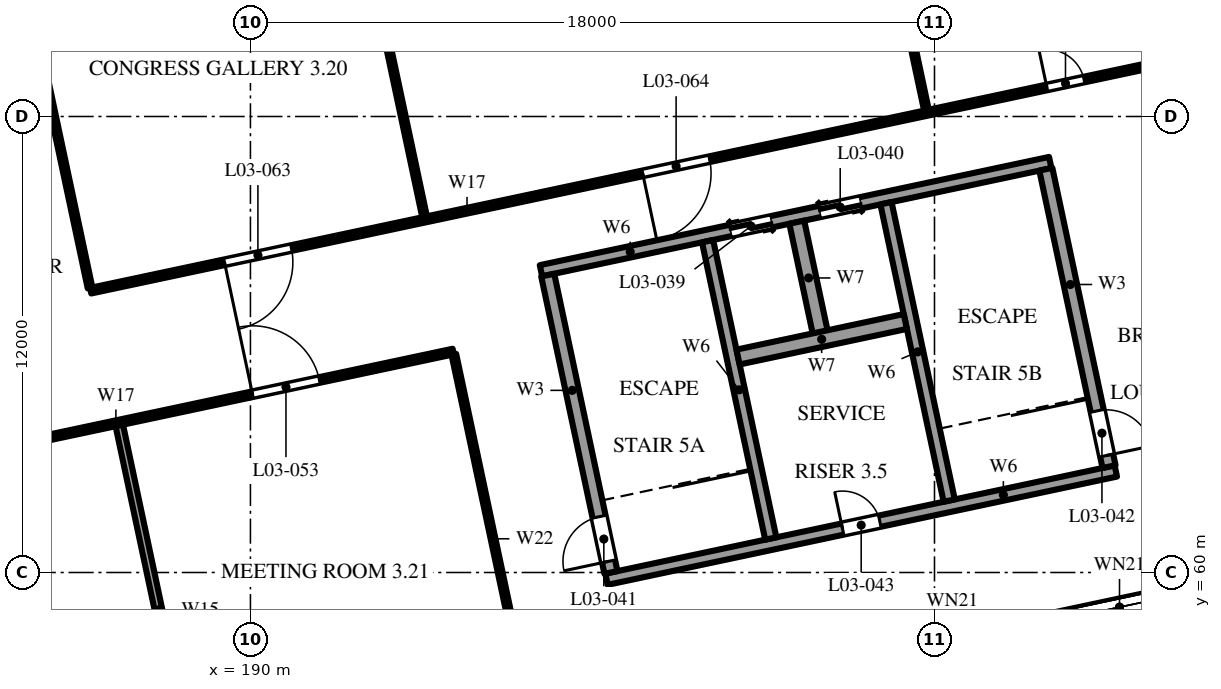
"""IFC4 building model, lengths in metres.
Left out: names, types, materials, properties, quantities, classifications, styles, units other than length and angle.
Written with IfcOpenShell. Run it as: python <this file> out.ifc"""

import sys

from ifc_helpers import new_model, si_unit, direction, frame, frame_2d, origin, place, context, subcontext, project, spatial, polyline, rectangle, outline, extrude, element, fill, save


model = new_model("IFC4")
c1 = context("Model", 3, precision=1e-05, world=origin(), true_north=direction((0.0, 1.0)))
c2 = subcontext(c1, "Body", "Model", "MODEL_VIEW")
j1 = project(units=[si_unit("LENGTHUNIT", "METRE"), si_unit("PLANEANGLEUNIT", "RADIAN")], contexts=[c1])
p1 = place(None, origin())
s1 = spatial("IfcSite", under=j1, at=p1, CompositionType="ELEMENT")
p2 = place(p1, origin())
s2 = spatial("IfcBuilding", under=s1, at=p2, CompositionType="ELEMENT")
p3 = place(p2, frame((0.0, 0.0, 16.8)))
s3 = spatial("IfcBuildingStorey", under=s2, at=p3, CompositionType="ELEMENT", Elevation=16.8)
p4 = place(p3, frame((199.371, 59.822, 0.0), z_axis=(0.0, 0.0, 1.0), x_axis=(0.978147662755, 0.20791139903, 0.0)))
e1 = element("IfcWall", 1, at=p4, inside=s3, PredefinedType="SHEAR", context=c2, shape_type="SweptSolid", body=[
    extrude(outline(polyline([(0.0, 0.0), (13.7, 0.0), (13.7, 14.977), (0.0, 14.244), (0.0, 0.0)])), frame((0.0, 0.15, 0.0), z_axis=(0.0, -1.0, 0.0), x_axis=(1.0, 0.0, 0.0)), (0.0, 0.0, 1.0), 0.3),
])
p5 = place(p4, frame((6.35, 0.0, 0.0)))
e2 = element("IfcOpeningElement", 2, at=p5, cuts=e1, PredefinedType="OPENING", context=c2, shape_type="SweptSolid", body=[
    extrude(rectangle(XDim=1.0, YDim=2.1, at=frame_2d((0.5, 1.05))), frame((0.0, 0.16, 0.0), z_axis=(0.0, -1.0, 0.0), x_axis=(1.0, 0.0, 0.0)), (0.0, 0.0, 1.0), 0.32),
])
p6 = place(p3, frame((197.645, 67.941, 0.0), z_axis=(0.0, 0.0, 1.0), x_axis=(0.978147662755, 0.20791139903, 0.0)))
e3 = element("IfcWall", 3, at=p6, inside=s3, PredefinedType="SHEAR", context=c2, shape_type="SweptSolid", body=[
    extrude(outline(polyline([(0.0, 0.0), (13.7, 0.0), (13.7, 14.542), (0.0, 13.809), (0.0, 0.0)])), frame((0.0, 0.15, 0.0), z_axis=(0.0, -1.0, 0.0), x_axis=(1.0, 0.0, 0.0)), (0.0, 0.0, 1.0), 0.3),
])
p7 = place(p6, frame((5.1, 0.0, 0.0)))
e4 = element("IfcOpeningElement", 4, at=p7, cuts=e3, PredefinedType="OPENING", context=c2, shape_type="SweptSolid", body=[
    extrude(rectangle(XDim=1.1, YDim=2.1, at=frame_2d((0.55, 1.05))), frame((0.0, 0.16, 0.0), z_axis=(0.0, -1.0, 0.0), x_axis=(1.0, 0.0, 0.0)), (0.0, 0.0, 1.0), 0.32),
])
p8 = place(p6, frame((7.5, 0.0, 0.0)))
e5 = element("IfcOpeningElement", 5, at=p8, cuts=e3, PredefinedType="OPENING", context=c2, shape_type="SweptSolid", body=[
    extrude(rectangle(XDim=1.1, YDim=2.1, at=frame_2d((0.55, 1.05))), frame((0.0, 0.16, 0.0), z_axis=(0.0, -1.0, 0.0), x_axis=(1.0, 0.0, 0.0)), (0.0, 0.0, 1.0), 0.32),
])
p9 = place(p3, frame((199.486, 60.0, 0.0), z_axis=(0.0, 0.0, 1.0), x_axis=(-0.207915693476, 0.978146749934, 0.0)))
e6 = element("IfcWall", 6, at=p9, inside=s3, PredefinedType="SOLIDWALL", context=c2, shape_type="SweptSolid", body=[
    extrude(outline(polyline([(0.0, 0.0), (8.0, 0.0), (8.0, 13.824), (0.0, 14.244), (0.0, 0.0)])), frame((0.0, 0.175, 0.0), z_axis=(0.0, -1.0, 0.0), x_axis=(1.0, 0.0, 0.0)), (0.0, 0.0, 1.0), 0.35),
])
p10 = place(p9, frame((0.3, 0.0, 0.0)))
e7 = element("IfcOpeningElement", 7, at=p10, cuts=e6, PredefinedType="OPENING", context=c2, shape_type="SweptSolid", body=[
    extrude(rectangle(XDim=1.2, YDim=2.1, at=frame_2d((0.6, 1.05))), frame((0.0, 0.185, 0.0), z_axis=(0.0, -1.0, 0.0), x_axis=(1.0, 0.0, 0.0)), (0.0, 0.0, 1.0), 0.37),
])
p11 = place(p3, frame((212.594, 62.786, 0.0), z_axis=(0.0, 0.0, 1.0), x_axis=(-0.207915693476, 0.978146749934, 0.0)))
e8 = element("IfcWall", 8, at=p11, inside=s3, PredefinedType="SOLIDWALL", context=c2, shape_type="SweptSolid", body=[
    extrude(outline(polyline([(0.0, 0.0), (8.0, 0.0), (8.0, 14.542), (0.0, 14.961), (0.0, 0.0)])), frame((0.0, 0.175, 0.0), z_axis=(0.0, -1.0, 0.0), x_axis=(1.0, 0.0, 0.0)), (0.0, 0.0, 1.0), 0.35),
])
p12 = place(p11, frame((0.3, 0.0, 0.0)))
e9 = element("IfcOpeningElement", 9, at=p12, cuts=e8, PredefinedType="OPENING", context=c2, shape_type="SweptSolid", body=[
    extrude(rectangle(XDim=1.2, YDim=2.1, at=frame_2d((0.6, 1.05))), frame((0.0, 0.185, 0.0), z_axis=(0.0, -1.0, 0.0), x_axis=(1.0, 0.0, 0.0)), (0.0, 0.0, 1.0), 0.37),
])
p13 = place(p3, frame((203.692, 60.894, 0.0), z_axis=(0.0, 0.0, 1.0), x_axis=(-0.207915693476, 0.978146749934, 0.0)))
e10 = element("IfcWall", 10, at=p13, inside=s3, PredefinedType="SHEAR", context=c2, shape_type="SweptSolid", body=[
    extrude(outline(polyline([(0.0, 0.0), (8.0, 0.0), (8.0, 14.054), (0.0, 14.474), (0.0, 0.0)])), frame((0.0, 0.15, 0.0), z_axis=(0.0, -1.0, 0.0), x_axis=(1.0, 0.0, 0.0)), (0.0, 0.0, 1.0), 0.3),
])
p14 = place(p3, frame((208.387, 61.892, 0.0), z_axis=(0.0, 0.0, 1.0), x_axis=(-0.207915693476, 0.978146749934, 0.0)))
e11 = element("IfcWall", 11, at=p14, inside=s3, PredefinedType="SHEAR", context=c2, shape_type="SweptSolid", body=[
    extrude(outline(polyline([(0.0, 0.0), (8.0, 0.0), (8.0, 14.311), (0.0, 14.731), (0.0, 0.0)])), frame((0.0, 0.15, 0.0), z_axis=(0.0, -1.0, 0.0), x_axis=(1.0, 0.0, 0.0)), (0.0, 0.0, 1.0), 0.3),
])
p15 = place(p3, frame((205.0, 66.284, 0.0), z_axis=(0.0, 0.0, 1.0), x_axis=(-0.207933702079, 0.978142921837, 0.0)))
e12 = element("IfcWall", 12, at=p15, inside=s3, PredefinedType="SHEAR", context=c2, shape_type="SweptSolid", body=[
    extrude(outline(polyline([(0.0, 0.0), (3.0, 0.0), (3.0, 14.183), (0.0, 14.34), (0.0, 0.0)])), frame((0.0, 0.2, 0.0), z_axis=(0.0, -1.0, 0.0), x_axis=(1.0, 0.0, 0.0)), (0.0, 0.0, 1.0), 0.4),
])
p16 = place(p3, frame((202.831, 65.669, 0.0), z_axis=(0.0, 0.0, 1.0), x_axis=(0.978149611564, 0.20790223038, 0.0)))
e13 = element("IfcWall", 13, at=p16, inside=s3, PredefinedType="SHEAR", context=c2, shape_type="SweptSolid", body=[
    extrude(outline(polyline([(0.0, 0.0), (4.5, 0.0), (4.5, 14.469), (0.0, 14.228), (0.0, 0.0)])), frame((0.0, 0.2, 0.0), z_axis=(0.0, -1.0, 0.0), x_axis=(1.0, 0.0, 0.0)), (0.0, 0.0, 1.0), 0.4),
])
p17 = place(p3, frame((210.814, 58.651, 0.0), z_axis=(0.0, 0.0, 1.0), x_axis=(0.978146440129, 0.207917150959, 0.0)))
e14 = element("IfcWall", 14, at=p17, inside=s3, PredefinedType="SOLIDWALL", context=c2, shape_type="SweptSolid", body=[
    extrude(outline(polyline([(0.0, 0.0), (4.2, 0.0), (4.2, 16.539), (0.0, 16.314), (0.0, 0.0)])), frame((0.0, 0.225, 0.0), z_axis=(0.0, -1.0, 0.0), x_axis=(1.0, 0.0, 0.0)), (0.0, 0.0, 1.0), 0.45),
])
p18 = place(p17, frame((0.9, 0.0, 0.45)))
e15 = element("IfcOpeningElement", 15, at=p18, cuts=e14, PredefinedType="OPENING", context=c2, shape_type="SweptSolid", body=[
    extrude(rectangle(XDim=2.4, YDim=3.3, at=frame_2d((1.2, 1.65))), frame((0.0, 0.235, 0.0), z_axis=(0.0, -1.0, 0.0), x_axis=(1.0, 0.0, 0.0)), (0.0, 0.0, 1.0), 0.47),
])
p19 = place(p17, frame((0.9, 0.0, 5.1)))
e16 = element("IfcOpeningElement", 16, at=p19, cuts=e14, PredefinedType="OPENING", context=c2, shape_type="SweptSolid", body=[
    extrude(rectangle(XDim=2.4, YDim=2.4, at=frame_2d((1.2, 1.2))), frame((0.0, 0.235, 0.0), z_axis=(0.0, -1.0, 0.0), x_axis=(1.0, 0.0, 0.0)), (0.0, 0.0, 1.0), 0.47),
])
p20 = place(p17, frame((0.9, 0.0, 9.3)))
e17 = element("IfcOpeningElement", 17, at=p20, cuts=e14, PredefinedType="OPENING", context=c2, shape_type="SweptSolid", body=[
    extrude(rectangle(XDim=2.4, YDim=2.4, at=frame_2d((1.2, 1.2))), frame((0.0, 0.235, 0.0), z_axis=(0.0, -1.0, 0.0), x_axis=(1.0, 0.0, 0.0)), (0.0, 0.0, 1.0), 0.47),
])
p21 = place(p3, frame((151.32, 56.458, 0.0), z_axis=(0.0, 0.0, 1.0), x_axis=(0.97814787394, 0.207910405482, 0.0)))
e18 = element("IfcWall", 18, at=p21, inside=s3, PredefinedType="PARTITIONING", context=c2, shape_type="SweptSolid", body=[
    extrude(outline(polyline([(0.0, 0.0), (45.0, 0.0), (45.0, 12.948), (0.0, 10.54), (0.0, 0.0)])), frame((0.0, 0.075, 0.0), z_axis=(0.0, -1.0, 0.0), x_axis=(1.0, 0.0, 0.0)), (0.0, 0.0, 1.0), 0.15),
])
p22 = place(p21, frame((3.6, 0.0, 0.0)))
e19 = element("IfcOpeningElement", 19, at=p22, cuts=e18, PredefinedType="OPENING", context=c2, shape_type="SweptSolid", body=[
    extrude(rectangle(XDim=1.8, YDim=2.1, at=frame_2d((0.9, 1.05))), frame((0.0, 0.085, 0.0), z_axis=(0.0, -1.0, 0.0), x_axis=(1.0, 0.0, 0.0)), (0.0, 0.0, 1.0), 0.17),
])
p23 = place(p21, frame((10.75, 0.0, 0.0)))
e20 = element("IfcOpeningElement", 20, at=p23, cuts=e18, PredefinedType="OPENING", context=c2, shape_type="SweptSolid", body=[
    extrude(rectangle(XDim=1.0, YDim=2.1, at=frame_2d((0.5, 1.05))), frame((0.0, 0.085, 0.0), z_axis=(0.0, -1.0, 0.0), x_axis=(1.0, 0.0, 0.0)), (0.0, 0.0, 1.0), 0.17),
])
p24 = place(p21, frame((17.1, 0.0, 0.0)))
e21 = element("IfcOpeningElement", 21, at=p24, cuts=e18, PredefinedType="OPENING", context=c2, shape_type="SweptSolid", body=[
    extrude(rectangle(XDim=1.8, YDim=2.1, at=frame_2d((0.9, 1.05))), frame((0.0, 0.085, 0.0), z_axis=(0.0, -1.0, 0.0), x_axis=(1.0, 0.0, 0.0)), (0.0, 0.0, 1.0), 0.17),
])
p25 = place(p21, frame((24.25, 0.0, 0.0)))
e22 = element("IfcOpeningElement", 22, at=p25, cuts=e18, PredefinedType="OPENING", context=c2, shape_type="SweptSolid", body=[
    extrude(rectangle(XDim=1.0, YDim=2.1, at=frame_2d((0.5, 1.05))), frame((0.0, 0.085, 0.0), z_axis=(0.0, -1.0, 0.0), x_axis=(1.0, 0.0, 0.0)), (0.0, 0.0, 1.0), 0.17),
])
p26 = place(p21, frame((30.75, 0.0, 0.0)))
e23 = element("IfcOpeningElement", 23, at=p26, cuts=e18, PredefinedType="OPENING", context=c2, shape_type="SweptSolid", body=[
    extrude(rectangle(XDim=1.5, YDim=2.1, at=frame_2d((0.75, 1.05))), frame((0.0, 0.085, 0.0), z_axis=(0.0, -1.0, 0.0), x_axis=(1.0, 0.0, 0.0)), (0.0, 0.0, 1.0), 0.17),
])
p27 = place(p21, frame((39.6, 0.0, 0.0)))
e24 = element("IfcOpeningElement", 24, at=p27, cuts=e18, PredefinedType="OPENING", context=c2, shape_type="SweptSolid", body=[
    extrude(rectangle(XDim=1.8, YDim=2.1, at=frame_2d((0.9, 1.05))), frame((0.0, 0.085, 0.0), z_axis=(0.0, -1.0, 0.0), x_axis=(1.0, 0.0, 0.0)), (0.0, 0.0, 1.0), 0.17),
])
p28 = place(p3, frame((188.613, 54.162, 0.0), z_axis=(0.0, 0.0, 1.0), x_axis=(-0.207932893358, 0.978143093754, 0.0)))
e25 = element("IfcWall", 25, at=p28, inside=s3, PredefinedType="PARTITIONING", context=c2, shape_type="SweptSolid", body=[
    extrude(outline(polyline([(0.0, 0.0), (9.925, 0.0), (9.925, 11.751), (0.0, 11.751), (0.0, 0.0)])), frame((0.0, 0.1, 0.0), z_axis=(0.0, -1.0, 0.0), x_axis=(1.0, 0.0, 0.0)), (0.0, 0.0, 1.0), 0.2),
])
p29 = place(p3, frame((197.416, 56.033, 0.0), z_axis=(0.0, 0.0, 1.0), x_axis=(-0.207904355568, 0.978149159861, 0.0)))
e26 = element("IfcWall", 26, at=p29, inside=s3, PredefinedType="PARTITIONING", context=c2, shape_type="SweptSolid", body=[
    extrude(outline(polyline([(0.0, 0.0), (9.925, 0.0), (9.925, 12.233), (0.0, 12.233), (0.0, 0.0)])), frame((0.0, 0.062, 0.0), z_axis=(0.0, -1.0, 0.0), x_axis=(1.0, 0.0, 0.0)), (0.0, 0.0, 1.0), 0.125),
])
p30 = place(p3, frame((185.795, 67.416, 0.0), z_axis=(0.0, 0.0, 1.0), x_axis=(0.978148801969, 0.20790603937, 0.0)))
e27 = element("IfcWall", 27, at=p30, inside=s3, PredefinedType="PARTITIONING", context=c2, shape_type="SweptSolid", body=[
    extrude(outline(polyline([(0.0, 0.0), (29.95, 0.0), (29.95, 13.883), (0.0, 12.28), (0.0, 0.0)])), frame((0.0, 0.075, 0.0), z_axis=(0.0, -1.0, 0.0), x_axis=(1.0, 0.0, 0.0)), (0.0, 0.0, 1.0), 0.15),
])
p31 = place(p30, frame((3.6, 0.0, 0.0)))
e28 = element("IfcOpeningElement", 28, at=p31, cuts=e27, PredefinedType="OPENING", context=c2, shape_type="SweptSolid", body=[
    extrude(rectangle(XDim=1.8, YDim=2.1, at=frame_2d((0.9, 1.05))), frame((0.0, 0.085, 0.0), z_axis=(0.0, -1.0, 0.0), x_axis=(1.0, 0.0, 0.0)), (0.0, 0.0, 1.0), 0.17),
])
p32 = place(p30, frame((14.85, 0.0, 0.0)))
e29 = element("IfcOpeningElement", 29, at=p32, cuts=e27, PredefinedType="OPENING", context=c2, shape_type="SweptSolid", body=[
    extrude(rectangle(XDim=1.8, YDim=2.1, at=frame_2d((0.9, 1.05))), frame((0.0, 0.085, 0.0), z_axis=(0.0, -1.0, 0.0), x_axis=(1.0, 0.0, 0.0)), (0.0, 0.0, 1.0), 0.17),
])
p33 = place(p30, frame((25.725, 0.0, 0.0)))
e30 = element("IfcOpeningElement", 30, at=p33, cuts=e27, PredefinedType="OPENING", context=c2, shape_type="SweptSolid", body=[
    extrude(rectangle(XDim=1.0, YDim=2.1, at=frame_2d((0.5, 1.05))), frame((0.0, 0.085, 0.0), z_axis=(0.0, -1.0, 0.0), x_axis=(1.0, 0.0, 0.0)), (0.0, 0.0, 1.0), 0.17),
])
p34 = place(p3, frame((183.716, 77.197, 0.0), z_axis=(0.0, 0.0, 1.0), x_axis=(0.207927890391, -0.978144157268, 0.0)))
e31 = element("IfcWall", 31, at=p34, inside=s3, PredefinedType="PARTITIONING", context=c2, shape_type="SweptSolid", body=[
    extrude(outline(polyline([(0.0, 0.0), (9.925, 0.0), (9.925, 11.751), (0.0, 11.751), (0.0, 0.0)])), frame((0.0, 0.062, 0.0), z_axis=(0.0, -1.0, 0.0), x_axis=(1.0, 0.0, 0.0)), (0.0, 0.0, 1.0), 0.125),
])
p35 = place(p3, frame((192.52, 79.068, 0.0), z_axis=(0.0, 0.0, 1.0), x_axis=(0.20790935802, -0.978148096582, 0.0)))
e32 = element("IfcWall", 32, at=p35, inside=s3, PredefinedType="PARTITIONING", context=c2, shape_type="SweptSolid", body=[
    extrude(outline(polyline([(0.0, 0.0), (9.925, 0.0), (9.925, 12.233), (0.0, 12.233), (0.0, 0.0)])), frame((0.0, 0.062, 0.0), z_axis=(0.0, -1.0, 0.0), x_axis=(1.0, 0.0, 0.0)), (0.0, 0.0, 1.0), 0.125),
])
p36 = place(p3, frame((205.724, 81.875, 0.0), z_axis=(0.0, 0.0, 1.0), x_axis=(0.207927890391, -0.978144157268, 0.0)))
e33 = element("IfcWall", 33, at=p36, inside=s3, PredefinedType="PARTITIONING", context=c2, shape_type="SweptSolid", body=[
    extrude(outline(polyline([(0.0, 0.0), (9.925, 0.0), (9.925, 13.256), (0.0, 12.96), (0.0, 0.0)])), frame((0.0, 0.062, 0.0), z_axis=(0.0, -1.0, 0.0), x_axis=(1.0, 0.0, 0.0)), (0.0, 0.0, 1.0), 0.125),
])
p37 = place(p18, origin())
e34 = element("IfcWindow", 34, at=p37, inside=s3, PartitioningType="DOUBLE_PANEL_VERTICAL", PredefinedType="WINDOW", context=c2, shape_type="SweptSolid", body=[
    extrude(rectangle(XDim=2.4, YDim=3.3, at=frame_2d((1.2, 1.65))), frame((0.0, 0.03, 0.0), z_axis=(0.0, -1.0, 0.0), x_axis=(1.0, 0.0, 0.0)), (0.0, 0.0, 1.0), 0.06),
])
fill(e15, e34)
p38 = place(p19, origin())
e35 = element("IfcWindow", 35, at=p38, inside=s3, PartitioningType="SINGLE_PANEL", PredefinedType="WINDOW", context=c2, shape_type="SweptSolid", body=[
    extrude(rectangle(XDim=2.4, YDim=2.4, at=frame_2d((1.2, 1.2))), frame((0.0, 0.03, 0.0), z_axis=(0.0, -1.0, 0.0), x_axis=(1.0, 0.0, 0.0)), (0.0, 0.0, 1.0), 0.06),
])
fill(e16, e35)
p39 = place(p20, origin())
e36 = element("IfcWindow", 36, at=p39, inside=s3, PartitioningType="SINGLE_PANEL", PredefinedType="WINDOW", context=c2, shape_type="SweptSolid", body=[
    extrude(rectangle(XDim=2.4, YDim=2.4, at=frame_2d((1.2, 1.2))), frame((0.0, 0.03, 0.0), z_axis=(0.0, -1.0, 0.0), x_axis=(1.0, 0.0, 0.0)), (0.0, 0.0, 1.0), 0.06),
])
fill(e17, e36)
p40 = place(p7, origin())
e37 = element("IfcDoor", 37, at=p40, inside=s3, OperationType="DOUBLE_DOOR_SLIDING", PredefinedType="DOOR", context=c2, shape_type="SweptSolid", body=[
    extrude(rectangle(XDim=1.1, YDim=2.1, at=frame_2d((0.55, 1.05))), frame((0.0, 0.025, 0.0), z_axis=(0.0, -1.0, 0.0), x_axis=(1.0, 0.0, 0.0)), (0.0, 0.0, 1.0), 0.05),
])
fill(e4, e37)
p41 = place(p8, origin())
e38 = element("IfcDoor", 38, at=p41, inside=s3, OperationType="DOUBLE_DOOR_SLIDING", PredefinedType="DOOR", context=c2, shape_type="SweptSolid", body=[
    extrude(rectangle(XDim=1.1, YDim=2.1, at=frame_2d((0.55, 1.05))), frame((0.0, 0.025, 0.0), z_axis=(0.0, -1.0, 0.0), x_axis=(1.0, 0.0, 0.0)), (0.0, 0.0, 1.0), 0.05),
])
fill(e5, e38)
p42 = place(p10, origin())
e39 = element("IfcDoor", 39, at=p42, inside=s3, OperationType="SINGLE_SWING_LEFT", PredefinedType="DOOR", context=c2, shape_type="SweptSolid", body=[
    extrude(rectangle(XDim=1.2, YDim=2.1, at=frame_2d((0.6, 1.05))), frame((0.0, 0.025, 0.0), z_axis=(0.0, -1.0, 0.0), x_axis=(1.0, 0.0, 0.0)), (0.0, 0.0, 1.0), 0.05),
])
fill(e7, e39)
p43 = place(p12, frame((1.2, 0.0, 0.0), z_axis=(0.0, 0.0, 1.0), x_axis=(-1.0, 0.0, 0.0)))
e40 = element("IfcDoor", 40, at=p43, inside=s3, OperationType="SINGLE_SWING_LEFT", PredefinedType="DOOR", context=c2, shape_type="SweptSolid", body=[
    extrude(rectangle(XDim=1.2, YDim=2.1, at=frame_2d((0.6, 1.05))), frame((0.0, 0.025, 0.0), z_axis=(0.0, -1.0, 0.0), x_axis=(1.0, 0.0, 0.0)), (0.0, 0.0, 1.0), 0.05),
])
fill(e9, e40)
p44 = place(p5, origin())
e41 = element("IfcDoor", 41, at=p44, inside=s3, OperationType="SINGLE_SWING_RIGHT", PredefinedType="DOOR", context=c2, shape_type="SweptSolid", body=[
    extrude(rectangle(XDim=1.0, YDim=2.1, at=frame_2d((0.5, 1.05))), frame((0.0, 0.025, 0.0), z_axis=(0.0, -1.0, 0.0), x_axis=(1.0, 0.0, 0.0)), (0.0, 0.0, 1.0), 0.05),
])
fill(e2, e41)
p45 = place(p27, origin())
e42 = element("IfcDoor", 42, at=p45, inside=s3, OperationType="DOUBLE_DOOR_SINGLE_SWING", PredefinedType="DOOR", context=c2, shape_type="SweptSolid", body=[
    extrude(rectangle(XDim=1.8, YDim=2.1, at=frame_2d((0.9, 1.05))), frame((0.0, 0.025, 0.0), z_axis=(0.0, -1.0, 0.0), x_axis=(1.0, 0.0, 0.0)), (0.0, 0.0, 1.0), 0.05),
])
fill(e24, e42)
p46 = place(p31, frame((1.8, 0.0, 0.0), z_axis=(0.0, 0.0, 1.0), x_axis=(-1.0, 0.0, 0.0)))
e43 = element("IfcDoor", 43, at=p46, inside=s3, OperationType="DOUBLE_DOOR_SINGLE_SWING", PredefinedType="DOOR", context=c2, shape_type="SweptSolid", body=[
    extrude(rectangle(XDim=1.8, YDim=2.1, at=frame_2d((0.9, 1.05))), frame((0.0, 0.025, 0.0), z_axis=(0.0, -1.0, 0.0), x_axis=(1.0, 0.0, 0.0)), (0.0, 0.0, 1.0), 0.05),
])
fill(e28, e43)
p47 = place(p32, frame((1.8, 0.0, 0.0), z_axis=(0.0, 0.0, 1.0), x_axis=(-1.0, 0.0, 0.0)))
e44 = element("IfcDoor", 44, at=p47, inside=s3, OperationType="DOUBLE_DOOR_SINGLE_SWING", PredefinedType="DOOR", context=c2, shape_type="SweptSolid", body=[
    extrude(rectangle(XDim=1.8, YDim=2.1, at=frame_2d((0.9, 1.05))), frame((0.0, 0.025, 0.0), z_axis=(0.0, -1.0, 0.0), x_axis=(1.0, 0.0, 0.0)), (0.0, 0.0, 1.0), 0.05),
])
fill(e29, e44)
p48 = place(p33, origin())
e45 = element("IfcDoor", 45, at=p48, inside=s3, OperationType="SINGLE_SWING_RIGHT", PredefinedType="DOOR", context=c2, shape_type="SweptSolid", body=[
    extrude(rectangle(XDim=1.0, YDim=2.1, at=frame_2d((0.5, 1.05))), frame((0.0, 0.025, 0.0), z_axis=(0.0, -1.0, 0.0), x_axis=(1.0, 0.0, 0.0)), (0.0, 0.0, 1.0), 0.05),
])
fill(e30, e45)
save(model, sys.argv[1])
